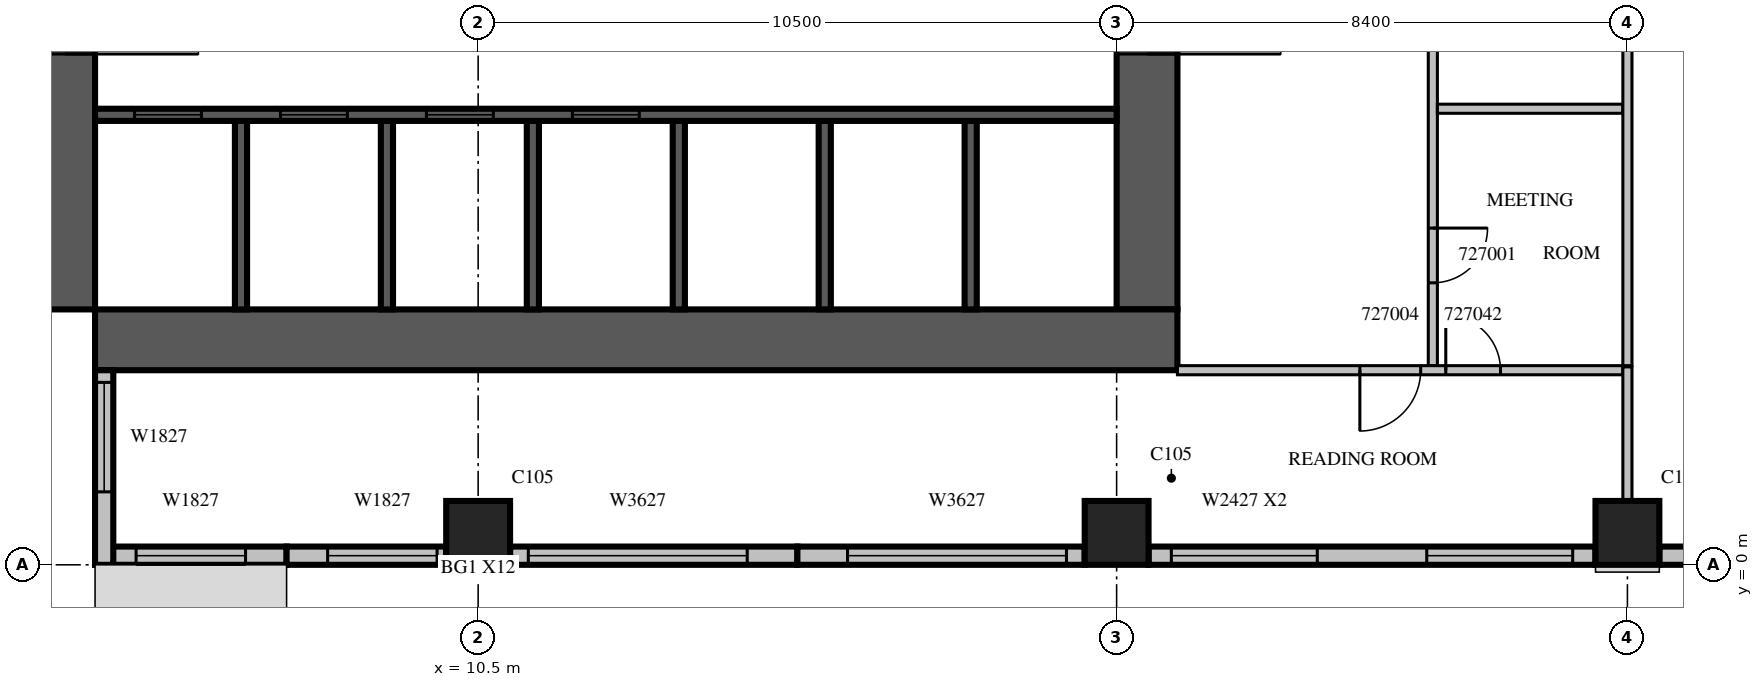
"""IFC4 building model, lengths in metres.
Left out: names, types, materials, properties, quantities, classifications, styles, units other than length and angle.
Written with IfcOpenShell. Run it as: python <this file> out.ifc"""

import sys

from ifc_helpers import new_model, si_unit, direction, frame, frame_2d, origin, origin_2d, place, context, subcontext, project, spatial, rectangle, extrude, source, transform, mapped, element, fill, save


model = new_model("IFC4")
c1 = context("Model", 3, precision=1e-05, world=origin(), true_north=direction((0.0, 1.0)))
c2 = subcontext(c1, "Body", "Model", "MODEL_VIEW")
j1 = project(units=[si_unit("LENGTHUNIT", "METRE"), si_unit("PLANEANGLEUNIT", "RADIAN")], contexts=[c1])
p1 = place(None, origin())
s1 = spatial("IfcSite", under=j1, at=p1, CompositionType="ELEMENT")
p2 = place(p1, origin())
s2 = spatial("IfcBuilding", under=s1, at=p2, CompositionType="ELEMENT")
p3 = place(p2, frame((0.0, 0.0, 124.5)))
s3 = spatial("IfcBuildingStorey", under=s2, at=p3, CompositionType="ELEMENT", Elevation=124.5)
m1 = source(origin(), c2, "Body", "SweptSolid", [
    extrude(rectangle(XDim=1.05, YDim=1.05, at=origin_2d()), origin(), (0.0, 0.0, 1.0), 4.2),
])
for number, where, z_axis, x_axis in (
    (1, (10.5, 0.525, 0.0), (0.0, 0.0, 1.0), (1.0, 0.0, 0.0)),
    (2, (21.0, 0.525, 0.0), (0.0, 0.0, 1.0), (1.0, 0.0, 0.0)),
    (3, (29.4, 0.525, 0.0), (0.0, 0.0, 1.0), (1.0, 0.0, 0.0)),
):
    element("IfcColumn", number, at=place(p3, frame(where, z_axis=z_axis, x_axis=x_axis)), inside=s3, PredefinedType="COLUMN", context=c2, shape_type="MappedRepresentation", body=[
        mapped(m1, transform((0.0, 0.0, 0.0), scale=1.0)),
    ])
m2 = source(origin(), c2, "Body", "SweptSolid", [
    extrude(rectangle(XDim=17.8, YDim=1.0, at=frame_2d((8.9, 0.0))), origin(), (0.0, 0.0, 1.0), 4.2),
])
p4 = place(p3, frame((3.7, 4.2, 0.0), z_axis=(0.0, 0.0, 1.0), x_axis=(0.0, 1.0, 0.0)))
e4 = element("IfcWall", 4, at=p4, inside=s3, PredefinedType="SHEAR", context=c2, shape_type="MappedRepresentation", body=[
    mapped(m2, transform((0.0, 0.0, 0.0), scale=1.0)),
])
m3 = source(origin(), c2, "Body", "SweptSolid", [
    extrude(rectangle(XDim=2.2, YDim=2.1, at=frame_2d((1.1, 1.05))), frame((0.0, 0.51, 0.0), z_axis=(0.0, -1.0, 0.0), x_axis=(1.0, 0.0, 0.0)), (0.0, 0.0, 1.0), 1.02),
])
p5 = place(p4, frame((4.2, 0.0, 0.0)))
e5 = element("IfcOpeningElement", 5, at=p5, cuts=e4, PredefinedType="OPENING", context=c2, shape_type="MappedRepresentation", body=[
    mapped(m3, transform((0.0, 0.0, 0.0), scale=1.0)),
])
m4 = source(origin(), c2, "Body", "SweptSolid", [
    extrude(rectangle(XDim=0.9, YDim=2.1, at=frame_2d((0.45, 1.05))), frame((0.0, 0.51, 0.0), z_axis=(0.0, -1.0, 0.0), x_axis=(1.0, 0.0, 0.0)), (0.0, 0.0, 1.0), 1.02),
])
p6 = place(p4, frame((10.95, 0.0, 0.0)))
e6 = element("IfcOpeningElement", 6, at=p6, cuts=e4, PredefinedType="OPENING", context=c2, shape_type="MappedRepresentation", body=[
    mapped(m4, transform((0.0, 0.0, 0.0), scale=1.0)),
])
m5 = source(origin(), c2, "Body", "SweptSolid", [
    extrude(rectangle(XDim=16.8, YDim=1.0, at=frame_2d((8.4, 0.0))), origin(), (0.0, 0.0, 1.0), 4.2),
])
p7 = place(p3, frame((21.5, 4.2, 0.0), z_axis=(0.0, 0.0, 1.0), x_axis=(0.0, 1.0, 0.0)))
e7 = element("IfcWall", 7, at=p7, inside=s3, PredefinedType="SHEAR", context=c2, shape_type="MappedRepresentation", body=[
    mapped(m5, transform((0.0, 0.0, 0.0), scale=1.0)),
])
p8 = place(p7, frame((4.2, 0.0, 0.0)))
e8 = element("IfcOpeningElement", 8, at=p8, cuts=e7, PredefinedType="OPENING", context=c2, shape_type="MappedRepresentation", body=[
    mapped(m3, transform((0.0, 0.0, 0.0), scale=1.0)),
])
m6 = source(origin(), c2, "Body", "SweptSolid", [
    extrude(rectangle(XDim=1.2, YDim=2.1, at=frame_2d((0.6, 1.05))), frame((0.0, 0.51, 0.0), z_axis=(0.0, -1.0, 0.0), x_axis=(1.0, 0.0, 0.0)), (0.0, 0.0, 1.0), 1.02),
])
p9 = place(p7, frame((14.7, 0.0, 0.0)))
e9 = element("IfcOpeningElement", 9, at=p9, cuts=e7, PredefinedType="OPENING", context=c2, shape_type="MappedRepresentation", body=[
    mapped(m6, transform((0.0, 0.0, 0.0), scale=1.0)),
])
p10 = place(p3, frame((4.2, 3.7, 0.0), z_axis=(0.0, 0.0, 1.0), x_axis=(1.0, 0.0, 0.0)))
e10 = element("IfcWall", 10, at=p10, inside=s3, PredefinedType="SHEAR", context=c2, shape_type="MappedRepresentation", body=[
    mapped(m2, transform((0.0, 0.0, 0.0), scale=1.0)),
])
m7 = source(origin(), c2, "Body", "SweptSolid", [
    extrude(rectangle(XDim=3.15, YDim=0.3, at=frame_2d((1.575, 0.0))), origin(), (0.0, 0.0, 1.0), 3.8),
])
p11 = place(p3, frame((4.2, 0.15, 0.0), z_axis=(0.0, 0.0, 1.0), x_axis=(1.0, 0.0, 0.0)))
e11 = element("IfcWall", 11, at=p11, inside=s3, PredefinedType="STANDARD", context=c2, shape_type="MappedRepresentation", body=[
    mapped(m7, transform((0.0, 0.0, 0.0), scale=1.0)),
])
m8 = source(origin(), c2, "Body", "SweptSolid", [
    extrude(rectangle(XDim=1.8, YDim=2.7, at=frame_2d((0.9, 1.35))), frame((0.0, 0.16, 0.0), z_axis=(0.0, -1.0, 0.0), x_axis=(1.0, 0.0, 0.0)), (0.0, 0.0, 1.0), 0.32),
])
p12 = place(p11, frame((0.675, 0.0, 0.6)))
e12 = element("IfcOpeningElement", 12, at=p12, cuts=e11, PredefinedType="OPENING", context=c2, shape_type="MappedRepresentation", body=[
    mapped(m8, transform((0.0, 0.0, 0.0), scale=1.0)),
])
m9 = source(origin(), c2, "Body", "SweptSolid", [
    extrude(rectangle(XDim=2.625, YDim=0.3, at=frame_2d((1.312, 0.0))), origin(), (0.0, 0.0, 1.0), 3.8),
])
p13 = place(p3, frame((7.35, 0.15, 0.0), z_axis=(0.0, 0.0, 1.0), x_axis=(1.0, 0.0, 0.0)))
e13 = element("IfcWall", 13, at=p13, inside=s3, PredefinedType="STANDARD", context=c2, shape_type="MappedRepresentation", body=[
    mapped(m9, transform((0.0, 0.0, 0.0), scale=1.0)),
])
p14 = place(p13, frame((0.675, 0.0, 0.6)))
e14 = element("IfcOpeningElement", 14, at=p14, cuts=e13, PredefinedType="OPENING", context=c2, shape_type="MappedRepresentation", body=[
    mapped(m8, transform((0.0, 0.0, 0.0), scale=1.0)),
])
p15 = place(p3, frame((11.025, 0.15, 0.0), z_axis=(0.0, 0.0, 1.0), x_axis=(1.0, 0.0, 0.0)))
e15 = element("IfcWall", 15, at=p15, inside=s3, PredefinedType="STANDARD", context=c2, shape_type="SweptSolid", body=[
    extrude(rectangle(XDim=4.725, YDim=0.3, at=frame_2d((2.362, 0.0))), origin(), (0.0, 0.0, 1.0), 3.8),
])
m10 = source(origin(), c2, "Body", "SweptSolid", [
    extrude(rectangle(XDim=3.6, YDim=2.7, at=frame_2d((1.8, 1.35))), frame((0.0, 0.16, 0.0), z_axis=(0.0, -1.0, 0.0), x_axis=(1.0, 0.0, 0.0)), (0.0, 0.0, 1.0), 0.32),
])
p16 = place(p15, frame((0.3, 0.0, 0.6)))
e16 = element("IfcOpeningElement", 16, at=p16, cuts=e15, PredefinedType="OPENING", context=c2, shape_type="MappedRepresentation", body=[
    mapped(m10, transform((0.0, 0.0, 0.0), scale=1.0)),
])
m11 = source(origin(), c2, "Body", "SweptSolid", [
    extrude(rectangle(XDim=4.725, YDim=0.3, at=frame_2d((2.362, 0.0))), origin(), (0.0, 0.0, 1.0), 3.8),
])
p17 = place(p3, frame((15.75, 0.15, 0.0), z_axis=(0.0, 0.0, 1.0), x_axis=(1.0, 0.0, 0.0)))
e17 = element("IfcWall", 17, at=p17, inside=s3, PredefinedType="STANDARD", context=c2, shape_type="MappedRepresentation", body=[
    mapped(m11, transform((0.0, 0.0, 0.0), scale=1.0)),
])
p18 = place(p17, frame((0.825, 0.0, 0.6)))
e18 = element("IfcOpeningElement", 18, at=p18, cuts=e17, PredefinedType="OPENING", context=c2, shape_type="MappedRepresentation", body=[
    mapped(m10, transform((0.0, 0.0, 0.0), scale=1.0)),
])
m12 = source(origin(), c2, "Body", "SweptSolid", [
    extrude(rectangle(XDim=7.35, YDim=0.3, at=frame_2d((3.675, 0.0))), origin(), (0.0, 0.0, 1.0), 3.8),
])
p19 = place(p3, frame((21.525, 0.15, 0.0), z_axis=(0.0, 0.0, 1.0), x_axis=(1.0, 0.0, 0.0)))
e19 = element("IfcWall", 19, at=p19, inside=s3, PredefinedType="STANDARD", context=c2, shape_type="MappedRepresentation", body=[
    mapped(m12, transform((0.0, 0.0, 0.0), scale=1.0)),
])
m13 = source(origin(), c2, "Body", "SweptSolid", [
    extrude(rectangle(XDim=2.4, YDim=2.7, at=frame_2d((1.2, 1.35))), frame((0.0, 0.16, 0.0), z_axis=(0.0, -1.0, 0.0), x_axis=(1.0, 0.0, 0.0)), (0.0, 0.0, 1.0), 0.32),
])
p20 = place(p19, frame((0.375, 0.0, 0.6)))
e20 = element("IfcOpeningElement", 20, at=p20, cuts=e19, PredefinedType="OPENING", context=c2, shape_type="MappedRepresentation", body=[
    mapped(m13, transform((0.0, 0.0, 0.0), scale=1.0)),
])
p21 = place(p19, frame((4.575, 0.0, 0.6)))
e21 = element("IfcOpeningElement", 21, at=p21, cuts=e19, PredefinedType="OPENING", context=c2, shape_type="MappedRepresentation", body=[
    mapped(m13, transform((0.0, 0.0, 0.0), scale=1.0)),
])
p22 = place(p3, frame((29.925, 0.15, 0.0), z_axis=(0.0, 0.0, 1.0), x_axis=(1.0, 0.0, 0.0)))
e22 = element("IfcWall", 22, at=p22, inside=s3, PredefinedType="STANDARD", context=c2, shape_type="MappedRepresentation", body=[
    mapped(m12, transform((0.0, 0.0, 0.0), scale=1.0)),
])
p23 = place(p22, frame((2.575, 0.0, 0.6)))
e23 = element("IfcOpeningElement", 23, at=p23, cuts=e22, PredefinedType="OPENING", context=c2, shape_type="MappedRepresentation", body=[
    mapped(m13, transform((0.0, 0.0, 0.0), scale=1.0)),
])
m14 = source(origin(), c2, "Body", "SweptSolid", [
    extrude(rectangle(XDim=3.2, YDim=0.3, at=frame_2d((1.6, 0.0))), origin(), (0.0, 0.0, 1.0), 3.8),
])
p24 = place(p3, frame((4.35, 3.2, 0.0), z_axis=(0.0, 0.0, 1.0), x_axis=(0.0, -1.0, 0.0)))
e24 = element("IfcWall", 24, at=p24, inside=s3, PredefinedType="STANDARD", context=c2, shape_type="MappedRepresentation", body=[
    mapped(m14, transform((0.0, 0.0, 0.0), scale=1.0)),
])
p25 = place(p24, frame((0.2, 0.0, 0.6)))
e25 = element("IfcOpeningElement", 25, at=p25, cuts=e24, PredefinedType="OPENING", context=c2, shape_type="MappedRepresentation", body=[
    mapped(m8, transform((0.0, 0.0, 0.0), scale=1.0)),
])
m15 = source(origin(), c2, "Body", "SweptSolid", [
    extrude(rectangle(XDim=3.1, YDim=0.2, at=frame_2d((1.55, 0.0))), origin(), (0.0, 0.0, 1.0), 4.2),
])
for number, where, z_axis, x_axis in (
    (26, (6.6, 4.2, 0.0), (0.0, 0.0, 1.0), (0.0, 1.0, 0.0)),
    (27, (9.0, 4.2, 0.0), (0.0, 0.0, 1.0), (0.0, 1.0, 0.0)),
    (28, (11.4, 4.2, 0.0), (0.0, 0.0, 1.0), (0.0, 1.0, 0.0)),
    (29, (13.8, 4.2, 0.0), (0.0, 0.0, 1.0), (0.0, 1.0, 0.0)),
    (30, (16.2, 4.2, 0.0), (0.0, 0.0, 1.0), (0.0, 1.0, 0.0)),
    (31, (18.6, 4.2, 0.0), (0.0, 0.0, 1.0), (0.0, 1.0, 0.0)),
):
    element("IfcWall", number, at=place(p3, frame(where, z_axis=z_axis, x_axis=x_axis)), inside=s3, PredefinedType="SOLIDWALL", context=c2, shape_type="MappedRepresentation", body=[
        mapped(m15, transform((0.0, 0.0, 0.0), scale=1.0)),
    ])
m16 = source(origin(), c2, "Body", "SweptSolid", [
    extrude(rectangle(XDim=16.8, YDim=0.2, at=frame_2d((8.4, 0.0))), origin(), (0.0, 0.0, 1.0), 4.2),
])
p26 = place(p3, frame((4.2, 7.4, 0.0), z_axis=(0.0, 0.0, 1.0), x_axis=(1.0, 0.0, 0.0)))
e32 = element("IfcWall", 32, at=p26, inside=s3, PredefinedType="SOLIDWALL", context=c2, shape_type="MappedRepresentation", body=[
    mapped(m16, transform((0.0, 0.0, 0.0), scale=1.0)),
])
m17 = source(origin(), c2, "Body", "SweptSolid", [
    extrude(rectangle(XDim=1.1, YDim=2.1, at=frame_2d((0.55, 1.05))), frame((0.0, 0.11, 0.0), z_axis=(0.0, -1.0, 0.0), x_axis=(1.0, 0.0, 0.0)), (0.0, 0.0, 1.0), 0.22),
])
p27 = place(p26, frame((0.65, 0.0, 0.0)))
e33 = element("IfcOpeningElement", 33, at=p27, cuts=e32, PredefinedType="OPENING", context=c2, shape_type="MappedRepresentation", body=[
    mapped(m17, transform((0.0, 0.0, 0.0), scale=1.0)),
])
p28 = place(p26, frame((3.05, 0.0, 0.0)))
e34 = element("IfcOpeningElement", 34, at=p28, cuts=e32, PredefinedType="OPENING", context=c2, shape_type="MappedRepresentation", body=[
    mapped(m17, transform((0.0, 0.0, 0.0), scale=1.0)),
])
p29 = place(p26, frame((5.45, 0.0, 0.0)))
e35 = element("IfcOpeningElement", 35, at=p29, cuts=e32, PredefinedType="OPENING", context=c2, shape_type="MappedRepresentation", body=[
    mapped(m17, transform((0.0, 0.0, 0.0), scale=1.0)),
])
p30 = place(p26, frame((7.85, 0.0, 0.0)))
e36 = element("IfcOpeningElement", 36, at=p30, cuts=e32, PredefinedType="OPENING", context=c2, shape_type="MappedRepresentation", body=[
    mapped(m17, transform((0.0, 0.0, 0.0), scale=1.0)),
])
m18 = source(origin(), c2, "Body", "SweptSolid", [
    extrude(rectangle(XDim=11.725, YDim=0.15, at=frame_2d((5.862, 0.0))), origin(), (0.0, 0.0, 1.0), 3.8),
])
p31 = place(p3, frame((26.2, 15.0, 0.0), z_axis=(0.0, 0.0, 1.0), x_axis=(0.0, -1.0, 0.0)))
e37 = element("IfcWall", 37, at=p31, inside=s3, PredefinedType="PARTITIONING", context=c2, shape_type="MappedRepresentation", body=[
    mapped(m18, transform((0.0, 0.0, 0.0), scale=1.0)),
])
m19 = source(origin(), c2, "Body", "SweptSolid", [
    extrude(rectangle(XDim=0.9, YDim=2.1, at=frame_2d((0.45, 1.05))), frame((0.0, 0.085, 0.0), z_axis=(0.0, -1.0, 0.0), x_axis=(1.0, 0.0, 0.0)), (0.0, 0.0, 1.0), 0.17),
])
p32 = place(p31, frame((9.463, 0.0, 0.0)))
e38 = element("IfcOpeningElement", 38, at=p32, cuts=e37, PredefinedType="OPENING", context=c2, shape_type="MappedRepresentation", body=[
    mapped(m19, transform((0.0, 0.0, 0.0), scale=1.0)),
])
p33 = place(p31, frame((2.725, 0.0, 0.0)))
e39 = element("IfcOpeningElement", 39, at=p33, cuts=e37, PredefinedType="OPENING", context=c2, shape_type="MappedRepresentation", body=[
    mapped(m19, transform((0.0, 0.0, 0.0), scale=1.0)),
])
m20 = source(origin(), c2, "Body", "SweptSolid", [
    extrude(rectangle(XDim=3.05, YDim=0.15, at=frame_2d((1.525, 0.0))), origin(), (0.0, 0.0, 1.0), 3.8),
])
p34 = place(p3, frame((29.325, 7.5, 0.0), z_axis=(0.0, 0.0, 1.0), x_axis=(-1.0, 0.0, 0.0)))
e40 = element("IfcWall", 40, at=p34, inside=s3, PredefinedType="PARTITIONING", context=c2, shape_type="MappedRepresentation", body=[
    mapped(m20, transform((0.0, 0.0, 0.0), scale=1.0)),
])
m21 = source(origin(), c2, "Body", "SweptSolid", [
    extrude(rectangle(XDim=6.701, YDim=0.15, at=frame_2d((3.35, 0.0))), origin(), (0.0, 0.0, 1.0), 3.8),
])
p35 = place(p3, frame((29.4, 3.275, 0.0), z_axis=(0.0, 0.0, 1.0), x_axis=(0.0, 1.0, 0.0)))
e41 = element("IfcWall", 41, at=p35, inside=s3, PredefinedType="PARTITIONING", context=c2, shape_type="MappedRepresentation", body=[
    mapped(m21, transform((0.0, 0.0, 0.0), scale=1.0)),
])
m22 = source(origin(), c2, "Body", "SweptSolid", [
    extrude(rectangle(XDim=7.325, YDim=0.15, at=frame_2d((3.663, 0.0))), origin(), (0.0, 0.0, 1.0), 3.8),
])
p36 = place(p3, frame((22.0, 3.2, 0.0), z_axis=(0.0, 0.0, 1.0), x_axis=(1.0, 0.0, 0.0)))
e42 = element("IfcWall", 42, at=p36, inside=s3, PredefinedType="PARTITIONING", context=c2, shape_type="MappedRepresentation", body=[
    mapped(m22, transform((0.0, 0.0, 0.0), scale=1.0)),
])
m23 = source(origin(), c2, "Body", "SweptSolid", [
    extrude(rectangle(XDim=1.0, YDim=2.1, at=frame_2d((0.5, 1.05))), frame((0.0, 0.085, 0.0), z_axis=(0.0, -1.0, 0.0), x_axis=(1.0, 0.0, 0.0)), (0.0, 0.0, 1.0), 0.17),
])
p37 = place(p36, frame((3.0, 0.0, 0.0)))
e43 = element("IfcOpeningElement", 43, at=p37, cuts=e42, PredefinedType="OPENING", context=c2, shape_type="MappedRepresentation", body=[
    mapped(m23, transform((0.0, 0.0, 0.0), scale=1.0)),
])
p38 = place(p36, frame((4.413, 0.0, 0.0)))
e44 = element("IfcOpeningElement", 44, at=p38, cuts=e42, PredefinedType="OPENING", context=c2, shape_type="MappedRepresentation", body=[
    mapped(m19, transform((0.0, 0.0, 0.0), scale=1.0)),
])
m24 = source(origin(), c2, "Body", "SweptSolid", [
    extrude(rectangle(XDim=2.206, YDim=0.15, at=frame_2d((1.103, 0.0))), origin(), (0.0, 0.0, 1.0), 3.8),
])
p39 = place(p3, frame((29.4, 1.049, 0.0), z_axis=(0.0, 0.0, 1.0), x_axis=(0.0, 1.0, 0.0)))
e45 = element("IfcWall", 45, at=p39, inside=s3, PredefinedType="PARTITIONING", context=c2, shape_type="MappedRepresentation", body=[
    mapped(m24, transform((0.0, 0.0, 0.0), scale=1.0)),
])
m25 = source(origin(), c2, "Body", "SweptSolid", [
    extrude(rectangle(XDim=1.8, YDim=2.7, at=frame_2d((0.9, 1.35))), frame((0.0, 0.03, 0.0), z_axis=(0.0, -1.0, 0.0), x_axis=(1.0, 0.0, 0.0)), (0.0, 0.0, 1.0), 0.06),
])
p40 = place(p12, origin())
e46 = element("IfcWindow", 46, at=p40, inside=s3, PartitioningType="SINGLE_PANEL", PredefinedType="WINDOW", context=c2, shape_type="MappedRepresentation", body=[
    mapped(m25, transform((0.0, 0.0, 0.0), scale=1.0)),
])
fill(e12, e46)
p41 = place(p14, origin())
e47 = element("IfcWindow", 47, at=p41, inside=s3, PartitioningType="SINGLE_PANEL", PredefinedType="WINDOW", context=c2, shape_type="MappedRepresentation", body=[
    mapped(m25, transform((0.0, 0.0, 0.0), scale=1.0)),
])
fill(e14, e47)
m26 = source(origin(), c2, "Body", "SweptSolid", [
    extrude(rectangle(XDim=3.6, YDim=2.7, at=frame_2d((1.8, 1.35))), frame((0.0, 0.03, 0.0), z_axis=(0.0, -1.0, 0.0), x_axis=(1.0, 0.0, 0.0)), (0.0, 0.0, 1.0), 0.06),
])
p42 = place(p16, origin())
e48 = element("IfcWindow", 48, at=p42, inside=s3, PartitioningType="SINGLE_PANEL", PredefinedType="WINDOW", context=c2, shape_type="MappedRepresentation", body=[
    mapped(m26, transform((0.0, 0.0, 0.0), scale=1.0)),
])
fill(e16, e48)
p43 = place(p18, origin())
e49 = element("IfcWindow", 49, at=p43, inside=s3, PartitioningType="SINGLE_PANEL", PredefinedType="WINDOW", context=c2, shape_type="MappedRepresentation", body=[
    mapped(m26, transform((0.0, 0.0, 0.0), scale=1.0)),
])
fill(e18, e49)
m27 = source(origin(), c2, "Body", "SweptSolid", [
    extrude(rectangle(XDim=2.4, YDim=2.7, at=frame_2d((1.2, 1.35))), frame((0.0, 0.03, 0.0), z_axis=(0.0, -1.0, 0.0), x_axis=(1.0, 0.0, 0.0)), (0.0, 0.0, 1.0), 0.06),
])
p44 = place(p20, origin())
e50 = element("IfcWindow", 50, at=p44, inside=s3, PartitioningType="SINGLE_PANEL", PredefinedType="WINDOW", context=c2, shape_type="MappedRepresentation", body=[
    mapped(m27, transform((0.0, 0.0, 0.0), scale=1.0)),
])
fill(e20, e50)
p45 = place(p21, origin())
e51 = element("IfcWindow", 51, at=p45, inside=s3, PartitioningType="SINGLE_PANEL", PredefinedType="WINDOW", context=c2, shape_type="MappedRepresentation", body=[
    mapped(m27, transform((0.0, 0.0, 0.0), scale=1.0)),
])
fill(e21, e51)
p46 = place(p25, origin())
e52 = element("IfcWindow", 52, at=p46, inside=s3, PartitioningType="SINGLE_PANEL", PredefinedType="WINDOW", context=c2, shape_type="MappedRepresentation", body=[
    mapped(m25, transform((0.0, 0.0, 0.0), scale=1.0)),
])
fill(e25, e52)
m28 = source(origin(), c2, "Body", "SweptSolid", [
    extrude(rectangle(XDim=1.1, YDim=2.1, at=frame_2d((0.55, 1.05))), frame((0.0, 0.025, 0.0), z_axis=(0.0, -1.0, 0.0), x_axis=(1.0, 0.0, 0.0)), (0.0, 0.0, 1.0), 0.05),
])
p47 = place(p27, origin())
e53 = element("IfcDoor", 53, at=p47, inside=s3, OperationType="SLIDING_TO_LEFT", PredefinedType="DOOR", context=c2, shape_type="MappedRepresentation", body=[
    mapped(m28, transform((0.0, 0.0, 0.0), scale=1.0)),
])
fill(e33, e53)
p48 = place(p28, origin())
e54 = element("IfcDoor", 54, at=p48, inside=s3, OperationType="SLIDING_TO_LEFT", PredefinedType="DOOR", context=c2, shape_type="MappedRepresentation", body=[
    mapped(m28, transform((0.0, 0.0, 0.0), scale=1.0)),
])
fill(e34, e54)
p49 = place(p29, origin())
e55 = element("IfcDoor", 55, at=p49, inside=s3, OperationType="SLIDING_TO_LEFT", PredefinedType="DOOR", context=c2, shape_type="MappedRepresentation", body=[
    mapped(m28, transform((0.0, 0.0, 0.0), scale=1.0)),
])
fill(e35, e55)
p50 = place(p30, origin())
e56 = element("IfcDoor", 56, at=p50, inside=s3, OperationType="SLIDING_TO_LEFT", PredefinedType="DOOR", context=c2, shape_type="MappedRepresentation", body=[
    mapped(m28, transform((0.0, 0.0, 0.0), scale=1.0)),
])
fill(e36, e56)
m29 = source(origin(), c2, "Body", "SweptSolid", [
    extrude(rectangle(XDim=2.2, YDim=2.1, at=frame_2d((1.1, 1.05))), frame((0.0, 0.025, 0.0), z_axis=(0.0, -1.0, 0.0), x_axis=(1.0, 0.0, 0.0)), (0.0, 0.0, 1.0), 0.05),
])
p51 = place(p8, origin())
e57 = element("IfcDoor", 57, at=p51, inside=s3, OperationType="DOUBLE_DOOR_SINGLE_SWING", PredefinedType="DOOR", context=c2, shape_type="MappedRepresentation", body=[
    mapped(m29, transform((0.0, 0.0, 0.0), scale=1.0)),
])
fill(e8, e57)
p52 = place(p5, origin())
e58 = element("IfcDoor", 58, at=p52, inside=s3, OperationType="DOUBLE_DOOR_SINGLE_SWING", PredefinedType="DOOR", context=c2, shape_type="MappedRepresentation", body=[
    mapped(m29, transform((0.0, 0.0, 0.0), scale=1.0)),
])
fill(e5, e58)
m30 = source(origin(), c2, "Body", "SweptSolid", [
    extrude(rectangle(XDim=0.9, YDim=2.1, at=frame_2d((0.45, 1.05))), frame((0.0, 0.025, 0.0), z_axis=(0.0, -1.0, 0.0), x_axis=(1.0, 0.0, 0.0)), (0.0, 0.0, 1.0), 0.05),
])
p53 = place(p32, origin())
e59 = element("IfcDoor", 59, at=p53, inside=s3, OperationType="SINGLE_SWING_LEFT", PredefinedType="DOOR", context=c2, shape_type="MappedRepresentation", body=[
    mapped(m30, transform((0.0, 0.0, 0.0), scale=1.0)),
])
fill(e38, e59)
m31 = source(origin(), c2, "Body", "SweptSolid", [
    extrude(rectangle(XDim=1.0, YDim=2.1, at=frame_2d((0.5, 1.05))), frame((0.0, 0.025, 0.0), z_axis=(0.0, -1.0, 0.0), x_axis=(1.0, 0.0, 0.0)), (0.0, 0.0, 1.0), 0.05),
])
p54 = place(p37, origin())
e60 = element("IfcDoor", 60, at=p54, inside=s3, OperationType="SINGLE_SWING_RIGHT", PredefinedType="DOOR", context=c2, shape_type="MappedRepresentation", body=[
    mapped(m31, transform((0.0, 0.0, 0.0), scale=1.0)),
])
fill(e43, e60)
p55 = place(p38, origin())
e61 = element("IfcDoor", 61, at=p55, inside=s3, OperationType="SINGLE_SWING_LEFT", PredefinedType="DOOR", context=c2, shape_type="MappedRepresentation", body=[
    mapped(m30, transform((0.0, 0.0, 0.0), scale=1.0)),
])
fill(e44, e61)
save(model, sys.argv[1])
